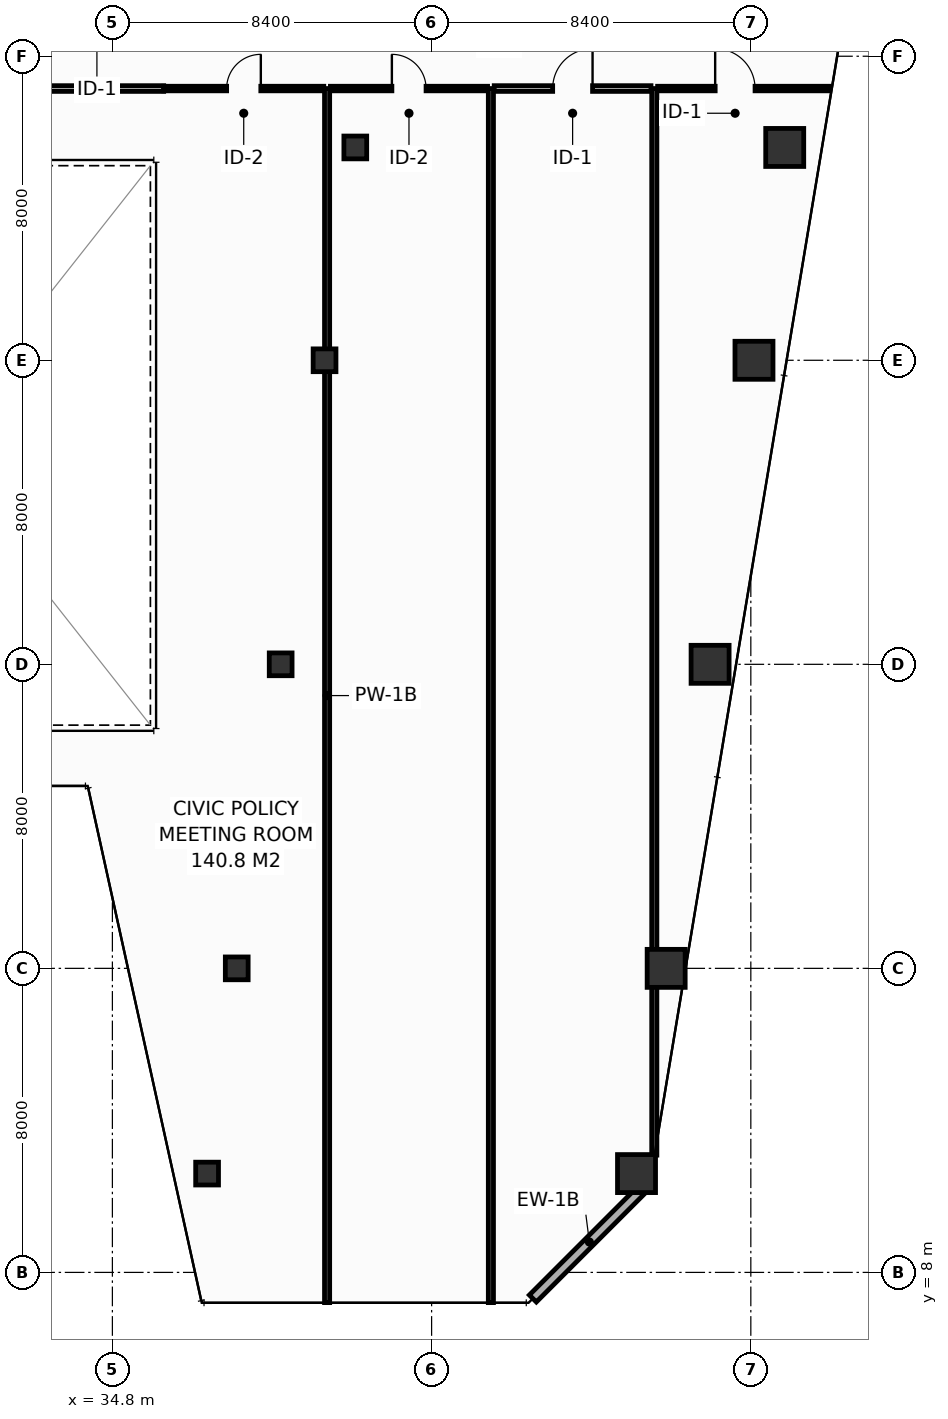
"""IFC4 building model, lengths in metres.
Left out: names, types, materials, properties, quantities, classifications, styles, units other than length and angle.
Written with IfcOpenShell. Run it as: python <this file> out.ifc"""

import sys

from ifc_helpers import new_model, si_unit, direction, frame, frame_2d, origin, origin_2d, place, context, subcontext, project, spatial, rectangle, hollow_rectangle, extrude, element, fill, save


model = new_model("IFC4")
c1 = context("Model", 3, precision=1e-05, world=origin(), true_north=direction((0.0, 1.0)))
c2 = subcontext(c1, "Body", "Model", "MODEL_VIEW")
j1 = project(units=[si_unit("LENGTHUNIT", "METRE"), si_unit("PLANEANGLEUNIT", "RADIAN")], contexts=[c1])
p1 = place(None, origin())
s1 = spatial("IfcSite", under=j1, at=p1, CompositionType="ELEMENT")
p2 = place(p1, origin())
s2 = spatial("IfcBuilding", under=s1, at=p2, CompositionType="ELEMENT")
p3 = place(p2, frame((0.0, 0.0, 148.6)))
s3 = spatial("IfcBuildingStorey", under=s2, at=p3, CompositionType="ELEMENT", Elevation=148.6)
p4 = place(p3, frame((48.592, 10.6, 0.0), z_axis=(0.0, 0.0, 1.0), x_axis=(1.0, 0.0, 0.0)))
e1 = element("IfcColumn", 1, at=p4, inside=s3, PredefinedType="COLUMN", context=c2, shape_type="SweptSolid", body=[
    extrude(hollow_rectangle(XDim=1.0, YDim=1.0, WallThickness=0.045, at=origin_2d()), origin(), (0.0, 0.0, 1.0), 3.8),
])
p5 = place(p3, frame((37.292, 10.6, 0.0), z_axis=(0.0, 0.0, 1.0), x_axis=(1.0, 0.0, 0.0)))
e2 = element("IfcColumn", 2, at=p5, inside=s3, PredefinedType="COLUMN", context=c2, shape_type="SweptSolid", body=[
    extrude(hollow_rectangle(XDim=0.6, YDim=0.6, WallThickness=0.028, at=origin_2d()), origin(), (0.0, 0.0, 1.0), 3.8),
])
p6 = place(p3, frame((49.372, 16.0, 0.0), z_axis=(0.0, 0.0, 1.0), x_axis=(1.0, 0.0, 0.0)))
e3 = element("IfcColumn", 3, at=p6, inside=s3, PredefinedType="COLUMN", context=c2, shape_type="SweptSolid", body=[
    extrude(hollow_rectangle(XDim=1.0, YDim=1.0, WallThickness=0.045, at=origin_2d()), origin(), (0.0, 0.0, 1.0), 3.8),
])
p7 = place(p3, frame((38.072, 16.0, 0.0), z_axis=(0.0, 0.0, 1.0), x_axis=(1.0, 0.0, 0.0)))
e4 = element("IfcColumn", 4, at=p7, inside=s3, PredefinedType="COLUMN", context=c2, shape_type="SweptSolid", body=[
    extrude(hollow_rectangle(XDim=0.6, YDim=0.6, WallThickness=0.028, at=origin_2d()), origin(), (0.0, 0.0, 1.0), 3.8),
])
p8 = place(p3, frame((50.528, 24.0, 0.0), z_axis=(0.0, 0.0, 1.0), x_axis=(1.0, 0.0, 0.0)))
e5 = element("IfcColumn", 5, at=p8, inside=s3, PredefinedType="COLUMN", context=c2, shape_type="SweptSolid", body=[
    extrude(hollow_rectangle(XDim=1.0, YDim=1.0, WallThickness=0.045, at=origin_2d()), origin(), (0.0, 0.0, 1.0), 3.8),
])
p9 = place(p3, frame((39.228, 24.0, 0.0), z_axis=(0.0, 0.0, 1.0), x_axis=(1.0, 0.0, 0.0)))
e6 = element("IfcColumn", 6, at=p9, inside=s3, PredefinedType="COLUMN", context=c2, shape_type="SweptSolid", body=[
    extrude(hollow_rectangle(XDim=0.6, YDim=0.6, WallThickness=0.028, at=origin_2d()), origin(), (0.0, 0.0, 1.0), 3.8),
])
p10 = place(p3, frame((51.683, 32.0, 0.0), z_axis=(0.0, 0.0, 1.0), x_axis=(1.0, 0.0, 0.0)))
e7 = element("IfcColumn", 7, at=p10, inside=s3, PredefinedType="COLUMN", context=c2, shape_type="SweptSolid", body=[
    extrude(hollow_rectangle(XDim=1.0, YDim=1.0, WallThickness=0.045, at=origin_2d()), origin(), (0.0, 0.0, 1.0), 3.8),
])
p11 = place(p3, frame((40.383, 32.0, 0.0), z_axis=(0.0, 0.0, 1.0), x_axis=(1.0, 0.0, 0.0)))
e8 = element("IfcColumn", 8, at=p11, inside=s3, PredefinedType="COLUMN", context=c2, shape_type="SweptSolid", body=[
    extrude(hollow_rectangle(XDim=0.6, YDim=0.6, WallThickness=0.028, at=origin_2d()), origin(), (0.0, 0.0, 1.0), 3.8),
])
p12 = place(p3, frame((52.492, 37.6, 0.0), z_axis=(0.0, 0.0, 1.0), x_axis=(1.0, 0.0, 0.0)))
e9 = element("IfcColumn", 9, at=p12, inside=s3, PredefinedType="COLUMN", context=c2, shape_type="SweptSolid", body=[
    extrude(hollow_rectangle(XDim=1.0, YDim=1.0, WallThickness=0.045, at=origin_2d()), origin(), (0.0, 0.0, 1.0), 3.8),
])
p13 = place(p3, frame((41.192, 37.6, 0.0), z_axis=(0.0, 0.0, 1.0), x_axis=(1.0, 0.0, 0.0)))
e10 = element("IfcColumn", 10, at=p13, inside=s3, PredefinedType="COLUMN", context=c2, shape_type="SweptSolid", body=[
    extrude(hollow_rectangle(XDim=0.6, YDim=0.6, WallThickness=0.028, at=origin_2d()), origin(), (0.0, 0.0, 1.0), 3.8),
])
p14 = place(p3, frame((45.864, 7.313, 0.0), z_axis=(0.0, 0.0, 1.0), x_axis=(0.70707775441, 0.707135806771, 0.0)))
e11 = element("IfcWall", 11, at=p14, inside=s3, PredefinedType="STANDARD", context=c2, shape_type="SweptSolid", body=[
    extrude(rectangle(XDim=4.206, YDim=0.26, at=frame_2d((2.103, 0.0))), origin(), (0.0, 0.0, 1.0), 3.55),
])
for number, where, z_axis, x_axis in (
    (12, (40.45, 7.205, 0.0), (0.0, 0.0, 1.0), (0.0, 1.0, 0.0)),
    (13, (44.76, 7.205, 0.0), (0.0, 0.0, 1.0), (0.0, 1.0, 0.0)),
):
    element("IfcWall", number, at=place(p3, frame(where, z_axis=z_axis, x_axis=x_axis)), inside=s3, PredefinedType="PARTITIONING", context=c2, shape_type="SweptSolid", body=[
        extrude(rectangle(XDim=31.945, YDim=0.135, at=frame_2d((15.972, 0.0))), origin(), (0.0, 0.0, 1.0), 2.835),
    ])
p15 = place(p3, frame((49.06, 11.085, 0.0), z_axis=(0.0, 0.0, 1.0), x_axis=(0.0, 1.0, 0.0)))
e14 = element("IfcWall", 14, at=p15, inside=s3, PredefinedType="PARTITIONING", context=c2, shape_type="SweptSolid", body=[
    extrude(rectangle(XDim=28.064, YDim=0.135, at=frame_2d((14.032, 0.0))), origin(), (0.0, 0.0, 1.0), 2.835),
])
p16 = place(p3, frame((23.85, 39.15, 0.0), z_axis=(0.0, 0.0, 1.0), x_axis=(1.0, 0.0, 0.0)))
e15 = element("IfcWall", 15, at=p16, inside=s3, PredefinedType="PARTITIONING", context=c2, shape_type="SweptSolid", body=[
    extrude(rectangle(XDim=12.3, YDim=0.15, at=frame_2d((6.15, 0.0))), origin(), (0.0, 0.0, 1.0), 3.55),
])
p17 = place(p3, frame((36.15, 39.15, 0.0), z_axis=(0.0, 0.0, 1.0), x_axis=(1.0, 0.0, 0.0)))
e16 = element("IfcWall", 16, at=p17, inside=s3, PredefinedType="PARTITIONING", context=c2, shape_type="SweptSolid", body=[
    extrude(rectangle(XDim=4.213, YDim=0.12, at=frame_2d((2.106, 0.0))), origin(), (0.0, 0.0, 1.0), 2.835),
])
p18 = place(p17, frame((1.656, 0.0, 0.0)))
e17 = element("IfcOpeningElement", 17, at=p18, cuts=e16, PredefinedType="OPENING", context=c2, shape_type="SweptSolid", body=[
    extrude(rectangle(XDim=0.9, YDim=2.1, at=frame_2d((0.45, 1.05))), frame((0.0, 0.07, 0.0), z_axis=(0.0, -1.0, 0.0), x_axis=(1.0, 0.0, 0.0)), (0.0, 0.0, 1.0), 0.14),
])
p19 = place(p3, frame((40.538, 39.15, 0.0), z_axis=(0.0, 0.0, 1.0), x_axis=(1.0, 0.0, 0.0)))
e18 = element("IfcWall", 18, at=p19, inside=s3, PredefinedType="PARTITIONING", context=c2, shape_type="SweptSolid", body=[
    extrude(rectangle(XDim=4.135, YDim=0.12, at=frame_2d((2.067, 0.0))), origin(), (0.0, 0.0, 1.0), 3.55),
])
p20 = place(p19, frame((1.617, 0.0, 0.0)))
e19 = element("IfcOpeningElement", 19, at=p20, cuts=e18, PredefinedType="OPENING", context=c2, shape_type="SweptSolid", body=[
    extrude(rectangle(XDim=0.9, YDim=2.1, at=frame_2d((0.45, 1.05))), frame((0.0, 0.07, 0.0), z_axis=(0.0, -1.0, 0.0), x_axis=(1.0, 0.0, 0.0)), (0.0, 0.0, 1.0), 0.14),
])
p21 = place(p3, frame((44.847, 39.15, 0.0), z_axis=(0.0, 0.0, 1.0), x_axis=(1.0, 0.0, 0.0)))
e20 = element("IfcWall", 20, at=p21, inside=s3, PredefinedType="PARTITIONING", context=c2, shape_type="SweptSolid", body=[
    extrude(rectangle(XDim=4.125, YDim=0.15, at=frame_2d((2.062, 0.0))), origin(), (0.0, 0.0, 1.0), 3.55),
])
p22 = place(p21, frame((1.538, 0.0, 0.0)))
e21 = element("IfcOpeningElement", 21, at=p22, cuts=e20, PredefinedType="OPENING", context=c2, shape_type="SweptSolid", body=[
    extrude(rectangle(XDim=1.05, YDim=2.15, at=frame_2d((0.525, 1.075))), frame((0.0, 0.085, 0.0), z_axis=(0.0, -1.0, 0.0), x_axis=(1.0, 0.0, 0.0)), (0.0, 0.0, 1.0), 0.17),
])
p23 = place(p3, frame((49.147, 39.15, 0.0), z_axis=(0.0, 0.0, 1.0), x_axis=(1.0, 0.0, 0.0)))
e22 = element("IfcWall", 22, at=p23, inside=s3, PredefinedType="PARTITIONING", context=c2, shape_type="SweptSolid", body=[
    extrude(rectangle(XDim=4.519, YDim=0.12, at=frame_2d((2.259, 0.0))), origin(), (0.0, 0.0, 1.0), 3.035),
])
p24 = place(p23, frame((1.514, 0.0, 0.0)))
e23 = element("IfcOpeningElement", 23, at=p24, cuts=e22, PredefinedType="OPENING", context=c2, shape_type="SweptSolid", body=[
    extrude(rectangle(XDim=1.05, YDim=2.15, at=frame_2d((0.525, 1.075))), frame((0.0, 0.07, 0.0), z_axis=(0.0, -1.0, 0.0), x_axis=(1.0, 0.0, 0.0)), (0.0, 0.0, 1.0), 0.14),
])
p25 = place(p18, origin())
e24 = element("IfcDoor", 24, at=p25, inside=s3, OperationType="SINGLE_SWING_RIGHT", PredefinedType="DOOR", context=c2, shape_type="SweptSolid", body=[
    extrude(rectangle(XDim=0.9, YDim=2.1, at=frame_2d((0.45, 1.05))), frame((0.0, 0.025, 0.0), z_axis=(0.0, -1.0, 0.0), x_axis=(1.0, 0.0, 0.0)), (0.0, 0.0, 1.0), 0.05),
])
fill(e17, e24)
p26 = place(p20, origin())
e25 = element("IfcDoor", 25, at=p26, inside=s3, OperationType="SINGLE_SWING_LEFT", PredefinedType="DOOR", context=c2, shape_type="SweptSolid", body=[
    extrude(rectangle(XDim=0.9, YDim=2.1, at=frame_2d((0.45, 1.05))), frame((0.0, 0.025, 0.0), z_axis=(0.0, -1.0, 0.0), x_axis=(1.0, 0.0, 0.0)), (0.0, 0.0, 1.0), 0.05),
])
fill(e19, e25)
p27 = place(p22, origin())
e26 = element("IfcDoor", 26, at=p27, inside=s3, OperationType="SINGLE_SWING_RIGHT", PredefinedType="DOOR", context=c2, shape_type="SweptSolid", body=[
    extrude(rectangle(XDim=1.05, YDim=2.15, at=frame_2d((0.525, 1.075))), frame((0.0, 0.025, 0.0), z_axis=(0.0, -1.0, 0.0), x_axis=(1.0, 0.0, 0.0)), (0.0, 0.0, 1.0), 0.05),
])
fill(e21, e26)
p28 = place(p24, origin())
e27 = element("IfcDoor", 27, at=p28, inside=s3, OperationType="SINGLE_SWING_LEFT", PredefinedType="DOOR", context=c2, shape_type="SweptSolid", body=[
    extrude(rectangle(XDim=1.05, YDim=2.15, at=frame_2d((0.525, 1.075))), frame((0.0, 0.025, 0.0), z_axis=(0.0, -1.0, 0.0), x_axis=(1.0, 0.0, 0.0)), (0.0, 0.0, 1.0), 0.05),
])
fill(e23, e27)
save(model, sys.argv[1])
